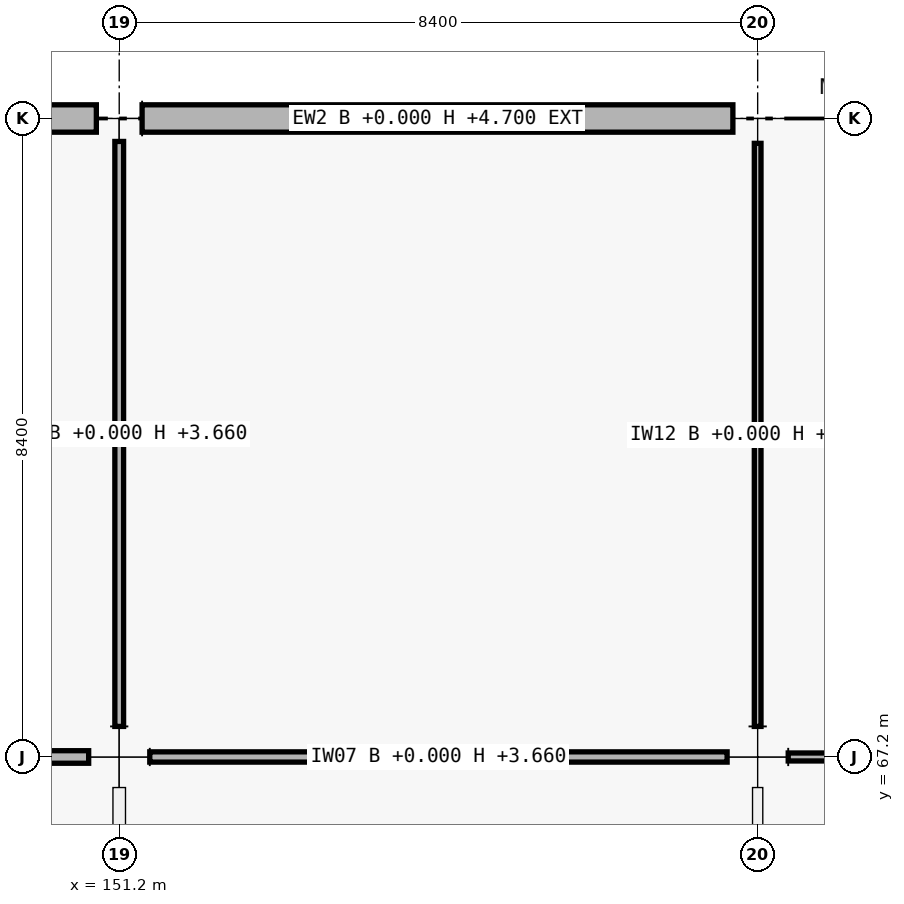
"""IFC4 building model, lengths in metres.
Left out: names, types, materials, properties, quantities, classifications, styles, units other than length and angle.
Written with IfcOpenShell. Run it as: python <this file> out.ifc"""

import sys

from ifc_helpers import new_model, si_unit, direction, frame, frame_2d, origin, origin_2d, place, context, subcontext, project, spatial, rectangle, extrude, element, fill, save


model = new_model("IFC4")
c1 = context("Model", 3, precision=1e-05, world=origin(), true_north=direction((0.0, 1.0)))
c2 = subcontext(c1, "Body", "Model", "MODEL_VIEW")
j1 = project(units=[si_unit("LENGTHUNIT", "METRE"), si_unit("PLANEANGLEUNIT", "RADIAN")], contexts=[c1])
p1 = place(None, origin())
s1 = spatial("IfcSite", under=j1, at=p1, CompositionType="ELEMENT")
p2 = place(p1, origin())
s2 = spatial("IfcBuilding", under=s1, at=p2, CompositionType="ELEMENT")
p3 = place(p2, origin())
s3 = spatial("IfcBuildingStorey", under=s2, at=p3, CompositionType="ELEMENT", Elevation=0.0)
p4 = place(p3, frame((151.2, 67.2, 0.0), z_axis=(0.0, 0.0, 1.0), x_axis=(1.0, 0.0, 0.0)))
e1 = element("IfcColumn", 1, at=p4, inside=s3, PredefinedType="COLUMN", context=c2, shape_type="SweptSolid", body=[
    extrude(rectangle(XDim=0.8, YDim=0.8, at=origin_2d()), origin(), (0.0, 0.0, 1.0), 5.76),
])
p5 = place(p3, frame((151.2, 75.6, 0.0), z_axis=(0.0, 0.0, 1.0), x_axis=(1.0, 0.0, 0.0)))
e2 = element("IfcColumn", 2, at=p5, inside=s3, PredefinedType="COLUMN", context=c2, shape_type="SweptSolid", body=[
    extrude(rectangle(XDim=0.6, YDim=0.6, at=origin_2d()), origin(), (0.0, 0.0, 1.0), 5.76),
])
p6 = place(p3, frame((159.6, 67.2, 0.0), z_axis=(0.0, 0.0, 1.0), x_axis=(1.0, 0.0, 0.0)))
e3 = element("IfcColumn", 3, at=p6, inside=s3, PredefinedType="COLUMN", context=c2, shape_type="SweptSolid", body=[
    extrude(rectangle(XDim=0.8, YDim=0.8, at=origin_2d()), origin(), (0.0, 0.0, 1.0), 5.76),
])
p7 = place(p3, frame((159.6, 75.6, 0.0), z_axis=(0.0, 0.0, 1.0), x_axis=(1.0, 0.0, 0.0)))
e4 = element("IfcColumn", 4, at=p7, inside=s3, PredefinedType="COLUMN", context=c2, shape_type="SweptSolid", body=[
    extrude(rectangle(XDim=0.65, YDim=0.65, at=origin_2d()), origin(), (0.0, 0.0, 1.0), 5.76),
])
p8 = place(p3, frame((143.126, 75.6, 0.0), z_axis=(0.0, 0.0, 1.0), x_axis=(1.0, 0.0, 0.0)))
e5 = element("IfcWall", 5, at=p8, inside=s3, PredefinedType="SOLIDWALL", context=c2, shape_type="SweptSolid", body=[
    extrude(rectangle(XDim=7.773, YDim=0.36, at=frame_2d((3.886, 0.0))), origin(), (0.0, 0.0, 1.0), 4.7),
])
p9 = place(p8, frame((2.837, 0.0, 0.9)))
e6 = element("IfcOpeningElement", 6, at=p9, cuts=e5, PredefinedType="OPENING", context=c2, shape_type="SweptSolid", body=[
    extrude(rectangle(XDim=2.1, YDim=1.8, at=frame_2d((1.05, 0.9))), frame((0.0, 0.18, 0.0), z_axis=(0.0, -1.0, 0.0), x_axis=(1.0, 0.0, 0.0)), (0.0, 0.0, 1.0), 0.36),
])
p10 = place(p3, frame((151.501, 75.6, 0.0), z_axis=(0.0, 0.0, 1.0), x_axis=(1.0, 0.0, 0.0)))
e7 = element("IfcWall", 7, at=p10, inside=s3, PredefinedType="SOLIDWALL", context=c2, shape_type="SweptSolid", body=[
    extrude(rectangle(XDim=7.773, YDim=0.36, at=frame_2d((3.886, 0.0))), origin(), (0.0, 0.0, 1.0), 4.7),
])
p11 = place(p10, frame((2.686, 0.0, 0.9)))
e8 = element("IfcOpeningElement", 8, at=p11, cuts=e7, PredefinedType="OPENING", context=c2, shape_type="SweptSolid", body=[
    extrude(rectangle(XDim=2.4, YDim=1.8, at=frame_2d((1.2, 0.9))), frame((0.0, 0.18, 0.0), z_axis=(0.0, -1.0, 0.0), x_axis=(1.0, 0.0, 0.0)), (0.0, 0.0, 1.0), 0.36),
])
p12 = place(p3, frame((143.202, 67.2, 0.0), z_axis=(0.0, 0.0, 1.0), x_axis=(1.0, 0.0, 0.0)))
e9 = element("IfcWall", 9, at=p12, inside=s3, PredefinedType="PARTITIONING", context=c2, shape_type="SweptSolid", body=[
    extrude(rectangle(XDim=7.596, YDim=0.165, at=frame_2d((3.798, 0.0))), origin(), (0.0, 0.0, 1.0), 3.66),
])
p13 = place(p12, frame((3.278, 0.0, 0.0)))
e10 = element("IfcOpeningElement", 10, at=p13, cuts=e9, PredefinedType="OPENING", context=c2, shape_type="SweptSolid", body=[
    extrude(rectangle(XDim=1.04, YDim=2.2, at=frame_2d((0.52, 1.1))), frame((0.0, 0.083, 0.0), z_axis=(0.0, -1.0, 0.0), x_axis=(1.0, 0.0, 0.0)), (0.0, 0.0, 1.0), 0.165),
])
p14 = place(p3, frame((151.602, 67.2, 0.0), z_axis=(0.0, 0.0, 1.0), x_axis=(1.0, 0.0, 0.0)))
e11 = element("IfcWall", 11, at=p14, inside=s3, PredefinedType="PARTITIONING", context=c2, shape_type="SweptSolid", body=[
    extrude(rectangle(XDim=7.596, YDim=0.135, at=frame_2d((3.798, 0.0))), origin(), (0.0, 0.0, 1.0), 3.66),
])
p15 = place(p14, frame((3.328, 0.0, 0.0)))
e12 = element("IfcOpeningElement", 12, at=p15, cuts=e11, PredefinedType="OPENING", context=c2, shape_type="SweptSolid", body=[
    extrude(rectangle(XDim=0.94, YDim=2.15, at=frame_2d((0.47, 1.075))), frame((0.0, 0.067, 0.0), z_axis=(0.0, -1.0, 0.0), x_axis=(1.0, 0.0, 0.0)), (0.0, 0.0, 1.0), 0.135),
])
p16 = place(p3, frame((160.002, 67.2, 0.0), z_axis=(0.0, 0.0, 1.0), x_axis=(1.0, 0.0, 0.0)))
e13 = element("IfcWall", 13, at=p16, inside=s3, PredefinedType="PARTITIONING", context=c2, shape_type="SweptSolid", body=[
    extrude(rectangle(XDim=7.596, YDim=0.105, at=frame_2d((3.798, 0.0))), origin(), (0.0, 0.0, 1.0), 3.66),
])
p17 = place(p16, frame((3.273, 0.0, 0.0)))
e14 = element("IfcOpeningElement", 14, at=p17, cuts=e13, PredefinedType="OPENING", context=c2, shape_type="SweptSolid", body=[
    extrude(rectangle(XDim=1.05, YDim=2.12, at=frame_2d((0.525, 1.06))), frame((0.0, 0.052, 0.0), z_axis=(0.0, -1.0, 0.0), x_axis=(1.0, 0.0, 0.0)), (0.0, 0.0, 1.0), 0.105),
])
p18 = place(p3, frame((151.2, 59.202, 0.0), z_axis=(0.0, 0.0, 1.0), x_axis=(0.0, 1.0, 0.0)))
e15 = element("IfcWall", 15, at=p18, inside=s3, PredefinedType="PARTITIONING", context=c2, shape_type="SweptSolid", body=[
    extrude(rectangle(XDim=7.596, YDim=0.165, at=frame_2d((3.798, 0.0))), origin(), (0.0, 0.0, 1.0), 3.66),
])
p19 = place(p18, frame((3.318, 0.0, 0.0)))
e16 = element("IfcOpeningElement", 16, at=p19, cuts=e15, PredefinedType="OPENING", context=c2, shape_type="SweptSolid", body=[
    extrude(rectangle(XDim=0.96, YDim=2.18, at=frame_2d((0.48, 1.09))), frame((0.0, 0.083, 0.0), z_axis=(0.0, -1.0, 0.0), x_axis=(1.0, 0.0, 0.0)), (0.0, 0.0, 1.0), 0.165),
])
p20 = place(p3, frame((151.2, 67.602, 0.0), z_axis=(0.0, 0.0, 1.0), x_axis=(0.0, 1.0, 0.0)))
e17 = element("IfcWall", 17, at=p20, inside=s3, PredefinedType="PARTITIONING", context=c2, shape_type="SweptSolid", body=[
    extrude(rectangle(XDim=7.696, YDim=0.115, at=frame_2d((3.848, 0.0))), origin(), (0.0, 0.0, 1.0), 3.66),
])
p21 = place(p20, frame((3.378, 0.0, 0.0)))
e18 = element("IfcOpeningElement", 18, at=p21, cuts=e17, PredefinedType="OPENING", context=c2, shape_type="SweptSolid", body=[
    extrude(rectangle(XDim=0.94, YDim=2.15, at=frame_2d((0.47, 1.075))), frame((0.0, 0.058, 0.0), z_axis=(0.0, -1.0, 0.0), x_axis=(1.0, 0.0, 0.0)), (0.0, 0.0, 1.0), 0.115),
])
p22 = place(p3, frame((159.6, 59.202, 0.0), z_axis=(0.0, 0.0, 1.0), x_axis=(0.0, 1.0, 0.0)))
e19 = element("IfcWall", 19, at=p22, inside=s3, PredefinedType="PARTITIONING", context=c2, shape_type="SweptSolid", body=[
    extrude(rectangle(XDim=7.596, YDim=0.135, at=frame_2d((3.798, 0.0))), origin(), (0.0, 0.0, 1.0), 3.66),
])
p23 = place(p22, frame((3.288, 0.0, 0.0)))
e20 = element("IfcOpeningElement", 20, at=p23, cuts=e19, PredefinedType="OPENING", context=c2, shape_type="SweptSolid", body=[
    extrude(rectangle(XDim=1.02, YDim=2.2, at=frame_2d((0.51, 1.1))), frame((0.0, 0.067, 0.0), z_axis=(0.0, -1.0, 0.0), x_axis=(1.0, 0.0, 0.0)), (0.0, 0.0, 1.0), 0.135),
])
p24 = place(p3, frame((159.6, 67.602, 0.0), z_axis=(0.0, 0.0, 1.0), x_axis=(0.0, 1.0, 0.0)))
e21 = element("IfcWall", 21, at=p24, inside=s3, PredefinedType="PARTITIONING", context=c2, shape_type="SweptSolid", body=[
    extrude(rectangle(XDim=7.671, YDim=0.088, at=frame_2d((3.835, 0.0))), origin(), (0.0, 0.0, 1.0), 3.66),
])
p25 = place(p24, frame((3.331, 0.0, 0.0)))
e22 = element("IfcOpeningElement", 22, at=p25, cuts=e21, PredefinedType="OPENING", context=c2, shape_type="SweptSolid", body=[
    extrude(rectangle(XDim=1.01, YDim=2.12, at=frame_2d((0.505, 1.06))), frame((0.0, 0.044, 0.0), z_axis=(0.0, -1.0, 0.0), x_axis=(1.0, 0.0, 0.0)), (0.0, 0.0, 1.0), 0.088),
])
p26 = place(p11, origin())
e23 = element("IfcWindow", 23, at=p26, inside=s3, PartitioningType="SINGLE_PANEL", PredefinedType="WINDOW", context=c2, shape_type="SweptSolid", body=[
    extrude(rectangle(XDim=2.4, YDim=1.8, at=frame_2d((1.2, 0.9))), frame((0.0, 0.03, 0.0), z_axis=(0.0, -1.0, 0.0), x_axis=(1.0, 0.0, 0.0)), (0.0, 0.0, 1.0), 0.06),
])
fill(e8, e23)
p27 = place(p15, origin())
e24 = element("IfcDoor", 24, at=p27, inside=s3, OperationType="SINGLE_SWING_RIGHT", PredefinedType="DOOR", context=c2, shape_type="SweptSolid", body=[
    extrude(rectangle(XDim=0.94, YDim=2.15, at=frame_2d((0.47, 1.075))), frame((0.0, 0.025, 0.0), z_axis=(0.0, -1.0, 0.0), x_axis=(1.0, 0.0, 0.0)), (0.0, 0.0, 1.0), 0.05),
])
fill(e12, e24)
p28 = place(p21, origin())
e25 = element("IfcDoor", 25, at=p28, inside=s3, OperationType="SINGLE_SWING_LEFT", PredefinedType="DOOR", context=c2, shape_type="SweptSolid", body=[
    extrude(rectangle(XDim=0.94, YDim=2.15, at=frame_2d((0.47, 1.075))), frame((0.0, 0.025, 0.0), z_axis=(0.0, -1.0, 0.0), x_axis=(1.0, 0.0, 0.0)), (0.0, 0.0, 1.0), 0.05),
])
fill(e18, e25)
p29 = place(p25, origin())
e26 = element("IfcDoor", 26, at=p29, inside=s3, OperationType="SINGLE_SWING_RIGHT", PredefinedType="DOOR", context=c2, shape_type="SweptSolid", body=[
    extrude(rectangle(XDim=1.01, YDim=2.12, at=frame_2d((0.505, 1.06))), frame((0.0, 0.025, 0.0), z_axis=(0.0, -1.0, 0.0), x_axis=(1.0, 0.0, 0.0)), (0.0, 0.0, 1.0), 0.05),
])
fill(e22, e26)
save(model, sys.argv[1])
